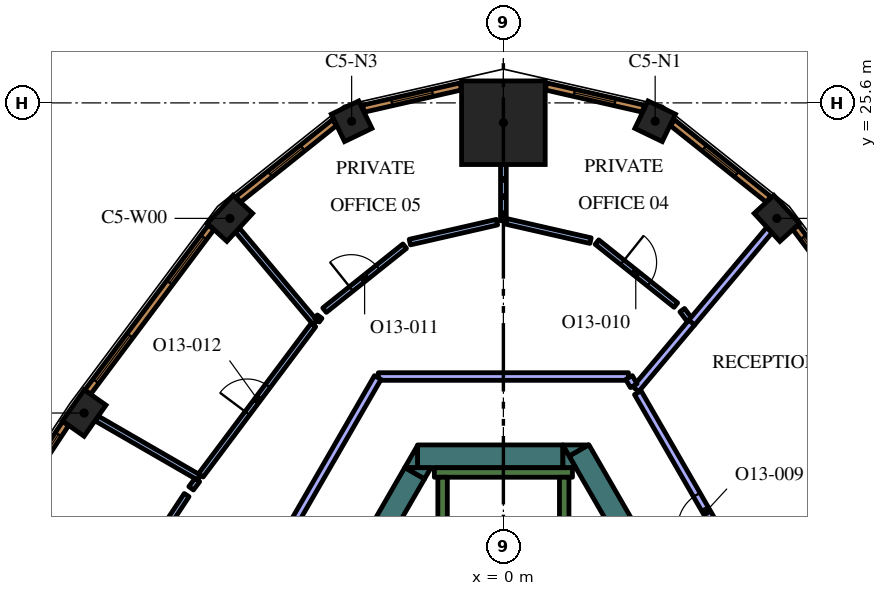
"""IFC4 building model, lengths in metres.
Left out: names, types, materials, properties, quantities, classifications, styles, units other than length and angle.
Written with IfcOpenShell. Run it as: python <this file> out.ifc"""

import sys

from ifc_helpers import new_model, si_unit, direction, frame, frame_2d, origin, origin_2d, place, context, subcontext, project, spatial, polyline, rectangle, outline, extrude, element, fill, save


model = new_model("IFC4")
c1 = context("Model", 3, precision=1e-05, world=origin(), true_north=direction((0.0, 1.0)))
c2 = subcontext(c1, "Body", "Model", "MODEL_VIEW")
j1 = project(units=[si_unit("LENGTHUNIT", "METRE"), si_unit("PLANEANGLEUNIT", "RADIAN")], contexts=[c1])
p1 = place(None, origin())
s1 = spatial("IfcSite", under=j1, at=p1, CompositionType="ELEMENT")
p2 = place(p1, origin())
s2 = spatial("IfcBuilding", under=s1, at=p2, CompositionType="ELEMENT")
p3 = place(p2, frame((0.0, 0.0, 296.4)))
s3 = spatial("IfcBuildingStorey", under=s2, at=p3, CompositionType="ELEMENT", Elevation=296.4)
p4 = place(p3, frame((0.0, 25.078, 0.0), z_axis=(0.0, 0.0, 1.0), x_axis=(0.0, 1.0, 0.0)))
e1 = element("IfcColumn", 1, at=p4, inside=s3, PredefinedType="COLUMN", context=c2, shape_type="SweptSolid", body=[
    extrude(rectangle(XDim=2.2, YDim=2.2, at=origin_2d()), origin(), (0.0, 0.0, 1.0), 4.2),
])
p5 = place(p3, frame((7.195, 22.561, 0.0), z_axis=(0.0, 0.0, 1.0), x_axis=(-0.67580250023, 0.737082750228, 0.0)))
e2 = element("IfcColumn", 2, at=p5, inside=s3, PredefinedType="COLUMN", context=c2, shape_type="SweptSolid", body=[
    extrude(rectangle(XDim=1.0, YDim=0.7, at=origin_2d()), origin(), (0.0, 0.0, 1.0), 4.2),
])
for number, where, z_axis, x_axis in (
    (3, (3.993, 25.116, 0.0), (0.0, 0.0, 1.0), (-0.901, 0.434, 0.0)),
    (4, (-3.993, 25.116, 0.0), (0.0, 0.0, 1.0), (-0.901, -0.434, 0.0)),
):
    element("IfcColumn", number, at=place(p3, frame(where, z_axis=z_axis, x_axis=x_axis)), inside=s3, PredefinedType="COLUMN", context=c2, shape_type="SweptSolid", body=[
        extrude(rectangle(XDim=0.8, YDim=0.8, at=origin_2d()), origin(), (0.0, 0.0, 1.0), 4.2),
    ])
for number, where, z_axis, x_axis in (
    (5, (-7.195, 22.561, 0.0), (0.0, 0.0, 1.0), (-0.676, -0.737, 0.0)),
    (6, (-11.032, 17.44, 0.0), (0.0, 0.0, 1.0), (-0.575, -0.818, 0.0)),
):
    element("IfcColumn", number, at=place(p3, frame(where, z_axis=z_axis, x_axis=x_axis)), inside=s3, PredefinedType="COLUMN", context=c2, shape_type="SweptSolid", body=[
        extrude(rectangle(XDim=1.0, YDim=0.7, at=origin_2d()), origin(), (0.0, 0.0, 1.0), 4.2),
    ])
p6 = place(p3, frame((1.989, 16.456, 0.0), z_axis=(0.0, 0.0, 1.0), x_axis=(0.499973159588, -0.866040899549, 0.0)))
e7 = element("IfcWall", 7, at=p6, inside=s3, PredefinedType="SOLIDWALL", context=c2, shape_type="SweptSolid", body=[
    extrude(rectangle(XDim=6.828, YDim=0.6, at=frame_2d((3.414, 0.0))), origin(), (0.0, 0.0, 1.0), 4.2),
])
p7 = place(p3, origin())
e8 = element("IfcWall", 8, at=p7, inside=s3, PredefinedType="SOLIDWALL", context=c2, shape_type="SweptSolid", body=[
    extrude(outline(polyline([(1.559, 16.6), (2.235, 16.6), (1.728, 16.307), (1.559, 16.6)])), origin(), (0.0, 0.0, 1.0), 4.2),
])
p8 = place(p3, frame((-2.258, 16.3, 0.0), z_axis=(0.0, 0.0, 1.0), x_axis=(1.0, 0.0, 0.0)))
e9 = element("IfcWall", 9, at=p8, inside=s3, PredefinedType="SOLIDWALL", context=c2, shape_type="SweptSolid", body=[
    extrude(rectangle(XDim=3.823, YDim=0.6, at=frame_2d((1.912, 0.0))), origin(), (0.0, 0.0, 1.0), 4.2),
])
e10 = element("IfcWall", 10, at=p7, inside=s3, PredefinedType="SOLIDWALL", context=c2, shape_type="SweptSolid", body=[
    extrude(outline(polyline([(1.905, 16.0), (1.567, 16.0), (1.567, 16.585), (1.905, 16.0)])), origin(), (0.0, 0.0, 1.0), 4.2),
])
e11 = element("IfcWall", 11, at=p7, inside=s3, PredefinedType="SOLIDWALL", context=c2, shape_type="SweptSolid", body=[
    extrude(outline(polyline([(-2.598, 16.0), (-2.26, 16.585), (-2.26, 16.0), (-2.598, 16.0)])), origin(), (0.0, 0.0, 1.0), 4.2),
])
p9 = place(p3, frame((-2.335, 15.855, 0.0), z_axis=(0.0, 0.0, 1.0), x_axis=(-0.499960127962, -0.866048422692, 0.0)))
e12 = element("IfcWall", 12, at=p9, inside=s3, PredefinedType="SOLIDWALL", context=c2, shape_type="SweptSolid", body=[
    extrude(rectangle(XDim=2.934, YDim=0.6, at=frame_2d((1.467, 0.0))), origin(), (0.0, 0.0, 1.0), 4.2),
])
e13 = element("IfcWall", 13, at=p7, inside=s3, PredefinedType="SOLIDWALL", context=c2, shape_type="SweptSolid", body=[
    extrude(outline(polyline([(-1.905, 16.0), (-2.074, 15.707), (-2.581, 16.0), (-1.905, 16.0)])), origin(), (0.0, 0.0, 1.0), 4.2),
])
p10 = place(p3, frame((-1.817, 15.875, 0.0), z_axis=(0.0, 0.0, 1.0), x_axis=(1.0, 0.0, 0.0)))
e14 = element("IfcWall", 14, at=p10, inside=s3, PredefinedType="SOLIDWALL", context=c2, shape_type="SweptSolid", body=[
    extrude(rectangle(XDim=3.634, YDim=0.25, at=frame_2d((1.817, 0.0))), origin(), (0.0, 0.0, 1.0), 4.2),
])
p11 = place(p3, frame((1.6, 8.95, 0.0), z_axis=(0.0, 0.0, 1.0), x_axis=(0.0, 1.0, 0.0)))
e15 = element("IfcWall", 15, at=p11, inside=s3, PredefinedType="SOLIDWALL", context=c2, shape_type="SweptSolid", body=[
    extrude(rectangle(XDim=6.8, YDim=0.25, at=frame_2d((3.4, 0.0))), origin(), (0.0, 0.0, 1.0), 4.2),
])
p12 = place(p3, frame((-1.6, 8.7, 0.0), z_axis=(0.0, 0.0, 1.0), x_axis=(0.0, 1.0, 0.0)))
e16 = element("IfcWall", 16, at=p12, inside=s3, PredefinedType="SOLIDWALL", context=c2, shape_type="SweptSolid", body=[
    extrude(rectangle(XDim=7.05, YDim=0.25, at=frame_2d((3.525, 0.0))), origin(), (0.0, 0.0, 1.0), 4.2),
])
p13 = place(p3, frame((4.95, 19.814, 0.0), z_axis=(0.0, 0.0, 1.0), x_axis=(0.642981953866, 0.765881326971, 0.0)))
e17 = element("IfcWall", 17, at=p13, inside=s3, PredefinedType="PARTITIONING", context=c2, shape_type="SweptSolid", body=[
    extrude(rectangle(XDim=3.188, YDim=0.2, at=frame_2d((1.594, 0.0))), origin(), (0.0, 0.0, 1.0), 3.55),
])
p14 = place(p3, frame((3.483, 18.067, 0.0), z_axis=(0.0, 0.0, 1.0), x_axis=(0.642896944312, 0.765952687177, 0.0)))
e18 = element("IfcWall", 18, at=p14, inside=s3, PredefinedType="PARTITIONING", context=c2, shape_type="SweptSolid", body=[
    extrude(rectangle(XDim=2.29, YDim=0.2, at=frame_2d((1.145, 0.0))), origin(), (0.0, 0.0, 1.0), 3.55),
])
p15 = place(p3, frame((7.188, 11.65, 0.0), z_axis=(0.0, 0.0, 1.0), x_axis=(-0.499989634868, 0.866031388014, 0.0)))
e19 = element("IfcWall", 19, at=p15, inside=s3, PredefinedType="PARTITIONING", context=c2, shape_type="SweptSolid", body=[
    extrude(rectangle(XDim=7.303, YDim=0.2, at=frame_2d((3.652, 0.0))), origin(), (0.0, 0.0, 1.0), 3.55),
])
p16 = place(p15, frame((3.2, 0.0, 0.0)))
e20 = element("IfcOpeningElement", 20, at=p16, cuts=e19, PredefinedType="OPENING", context=c2, shape_type="SweptSolid", body=[
    extrude(rectangle(XDim=1.0, YDim=2.1, at=frame_2d((0.5, 1.05))), frame((0.0, 0.11, 0.0), z_axis=(0.0, -1.0, 0.0), x_axis=(1.0, 0.0, 0.0)), (0.0, 0.0, 1.0), 0.22),
])
p17 = place(p3, frame((0.0, 22.5, 0.0), z_axis=(0.0, 0.0, 1.0), x_axis=(0.0, 1.0, 0.0)))
e21 = element("IfcWall", 21, at=p17, inside=s3, PredefinedType="PARTITIONING", context=c2, shape_type="SweptSolid", body=[
    extrude(rectangle(XDim=1.479, YDim=0.15, at=frame_2d((0.739, 0.0))), origin(), (0.0, 0.0, 1.0), 3.55),
])
p18 = place(p3, frame((4.891, 19.899, 0.0), z_axis=(0.0, 0.0, 1.0), x_axis=(-0.6, 0.8, 0.0)))
e22 = element("IfcWall", 22, at=p18, inside=s3, PredefinedType="PARTITIONING", context=c2, shape_type="SweptSolid", body=[
    extrude(rectangle(XDim=0.309, YDim=0.15, at=frame_2d((0.154, 0.0))), origin(), (0.0, 0.0, 1.0), 3.55),
])
p19 = place(p3, frame((2.462, 21.937, 0.0), z_axis=(0.0, 0.0, 1.0), x_axis=(0.781630346222, -0.62374193531, 0.0)))
e23 = element("IfcWall", 23, at=p19, inside=s3, PredefinedType="PARTITIONING", context=c2, shape_type="SweptSolid", body=[
    extrude(rectangle(XDim=2.656, YDim=0.15, at=frame_2d((1.328, 0.0))), origin(), (0.0, 0.0, 1.0), 3.55),
])
p20 = place(p19, frame((0.857, 0.0, 0.0)))
e24 = element("IfcOpeningElement", 24, at=p20, cuts=e23, PredefinedType="OPENING", context=c2, shape_type="SweptSolid", body=[
    extrude(rectangle(XDim=0.9, YDim=2.1, at=frame_2d((0.45, 1.05))), frame((0.0, 0.085, 0.0), z_axis=(0.0, -1.0, 0.0), x_axis=(1.0, 0.0, 0.0)), (0.0, 0.0, 1.0), 0.17),
])
p21 = place(p3, frame((2.293, 21.976, 0.0), z_axis=(0.0, 0.0, 1.0), x_axis=(-0.974905760283, 0.22261796551, 0.0)))
e25 = element("IfcWall", 25, at=p21, inside=s3, PredefinedType="PARTITIONING", context=c2, shape_type="SweptSolid", body=[
    extrude(rectangle(XDim=2.276, YDim=0.15, at=frame_2d((1.138, 0.0))), origin(), (0.0, 0.0, 1.0), 3.55),
])
p22 = place(p3, frame((-4.952, 19.817, 0.0), z_axis=(0.0, 0.0, 1.0), x_axis=(-0.643023053688, 0.765846820471, 0.0)))
e26 = element("IfcWall", 26, at=p22, inside=s3, PredefinedType="PARTITIONING", context=c2, shape_type="SweptSolid", body=[
    extrude(rectangle(XDim=3.184, YDim=0.15, at=frame_2d((1.592, 0.0))), origin(), (0.0, 0.0, 1.0), 3.55),
])
p23 = place(p3, frame((-0.168, 22.461, 0.0), z_axis=(0.0, 0.0, 1.0), x_axis=(-0.974885550769, -0.222706450069, 0.0)))
e27 = element("IfcWall", 27, at=p23, inside=s3, PredefinedType="PARTITIONING", context=c2, shape_type="SweptSolid", body=[
    extrude(rectangle(XDim=2.353, YDim=0.15, at=frame_2d((1.176, 0.0))), origin(), (0.0, 0.0, 1.0), 3.55),
])
p24 = place(p3, frame((-4.706, 20.146, 0.0), z_axis=(0.0, 0.0, 1.0), x_axis=(0.781592149204, 0.623789798172, 0.0)))
e28 = element("IfcWall", 28, at=p24, inside=s3, PredefinedType="PARTITIONING", context=c2, shape_type="SweptSolid", body=[
    extrude(rectangle(XDim=2.698, YDim=0.15, at=frame_2d((1.349, 0.0))), origin(), (0.0, 0.0, 1.0), 3.55),
])
p25 = place(p24, frame((0.898, 0.0, 0.0)))
e29 = element("IfcOpeningElement", 29, at=p25, cuts=e28, PredefinedType="OPENING", context=c2, shape_type="SweptSolid", body=[
    extrude(rectangle(XDim=0.9, YDim=2.1, at=frame_2d((0.45, 1.05))), frame((0.0, 0.085, 0.0), z_axis=(0.0, -1.0, 0.0), x_axis=(1.0, 0.0, 0.0)), (0.0, 0.0, 1.0), 0.17),
])
p26 = place(p3, frame((-4.834, 19.975, 0.0), z_axis=(0.0, 0.0, 1.0), x_axis=(-0.599349659863, -0.800487342325, 0.0)))
e30 = element("IfcWall", 30, at=p26, inside=s3, PredefinedType="PARTITIONING", context=c2, shape_type="SweptSolid", body=[
    extrude(rectangle(XDim=0.12, YDim=0.15, at=frame_2d((0.06, 0.0))), origin(), (0.0, 0.0, 1.0), 3.55),
])
p27 = place(p3, frame((-8.007, 15.74, 0.0), z_axis=(0.0, 0.0, 1.0), x_axis=(-0.866044607523, 0.499966736674, 0.0)))
e31 = element("IfcWall", 31, at=p27, inside=s3, PredefinedType="PARTITIONING", context=c2, shape_type="SweptSolid", body=[
    extrude(rectangle(XDim=3.115, YDim=0.15, at=frame_2d((1.557, 0.0))), origin(), (0.0, 0.0, 1.0), 3.55),
])
p28 = place(p3, frame((-7.962, 15.8, 0.0), z_axis=(0.0, 0.0, 1.0), x_axis=(0.599541489613, 0.800343677574, 0.0)))
e32 = element("IfcWall", 32, at=p28, inside=s3, PredefinedType="PARTITIONING", context=c2, shape_type="SweptSolid", body=[
    extrude(rectangle(XDim=4.942, YDim=0.15, at=frame_2d((2.471, 0.0))), origin(), (0.0, 0.0, 1.0), 3.55),
])
p29 = place(p28, frame((2.042, 0.0, 0.0)))
e33 = element("IfcOpeningElement", 33, at=p29, cuts=e32, PredefinedType="OPENING", context=c2, shape_type="SweptSolid", body=[
    extrude(rectangle(XDim=0.9, YDim=2.1, at=frame_2d((0.45, 1.05))), frame((0.0, 0.085, 0.0), z_axis=(0.0, -1.0, 0.0), x_axis=(1.0, 0.0, 0.0)), (0.0, 0.0, 1.0), 0.17),
])
p30 = place(p3, frame((-8.052, 15.679, 0.0), z_axis=(0.0, 0.0, 1.0), x_axis=(-0.599004157744, -0.800745914136, 0.0)))
e34 = element("IfcWall", 34, at=p30, inside=s3, PredefinedType="PARTITIONING", context=c2, shape_type="SweptSolid", body=[
    extrude(rectangle(XDim=0.275, YDim=0.15, at=frame_2d((0.137, 0.0))), origin(), (0.0, 0.0, 1.0), 3.55),
])
p31 = place(p3, frame((-11.523, 10.449, 0.0), z_axis=(0.0, 0.0, 1.0), x_axis=(0.550751709023, 0.834669129061, 0.0)))
e35 = element("IfcWall", 35, at=p31, inside=s3, PredefinedType="PARTITIONING", context=c2, shape_type="SweptSolid", body=[
    extrude(rectangle(XDim=5.788, YDim=0.15, at=frame_2d((2.894, 0.0))), origin(), (0.0, 0.0, 1.0), 3.55),
])
p32 = place(p31, frame((2.488, 0.0, 0.0)))
e36 = element("IfcOpeningElement", 36, at=p32, cuts=e35, PredefinedType="OPENING", context=c2, shape_type="SweptSolid", body=[
    extrude(rectangle(XDim=0.9, YDim=2.1, at=frame_2d((0.45, 1.05))), frame((0.0, 0.085, 0.0), z_axis=(0.0, -1.0, 0.0), x_axis=(1.0, 0.0, 0.0)), (0.0, 0.0, 1.0), 0.17),
])
p33 = place(p3, frame((3.291, 18.4, 0.0), z_axis=(0.0, 0.0, 1.0), x_axis=(-1.0, 0.0, 0.0)))
e37 = element("IfcWall", 37, at=p33, inside=s3, PredefinedType="PARTITIONING", context=c2, shape_type="SweptSolid", body=[
    extrude(rectangle(XDim=6.582, YDim=0.2, at=frame_2d((3.291, 0.0))), origin(), (0.0, 0.0, 1.0), 3.55),
])
p34 = place(p3, frame((-3.306, 18.374, 0.0), z_axis=(0.0, 0.0, 1.0), x_axis=(-0.499999798456, -0.866025520146, 0.0)))
e38 = element("IfcWall", 38, at=p34, inside=s3, PredefinedType="PARTITIONING", context=c2, shape_type="SweptSolid", body=[
    extrude(rectangle(XDim=8.229, YDim=0.2, at=frame_2d((4.115, 0.0))), origin(), (0.0, 0.0, 1.0), 3.55),
])
p35 = place(p3, frame((3.43, 18.159, 0.0), z_axis=(0.0, 0.0, 1.0), x_axis=(-0.499949632511, 0.866054481515, 0.0)))
e39 = element("IfcWall", 39, at=p35, inside=s3, PredefinedType="PARTITIONING", context=c2, shape_type="SweptSolid", body=[
    extrude(rectangle(XDim=0.248, YDim=0.2, at=frame_2d((0.124, 0.0))), origin(), (0.0, 0.0, 1.0), 3.55),
])
p36 = place(p3, frame((10.938, 17.99, 0.0), z_axis=(0.0, 0.0, 1.0), x_axis=(-0.599559865294, 0.800329911929, 0.0)))
e40 = element("IfcWall", 40, at=p36, inside=s3, PredefinedType="SOLIDWALL", context=c2, shape_type="SweptSolid", body=[
    extrude(rectangle(XDim=5.415, YDim=0.19, at=frame_2d((2.708, 0.0))), origin(), (0.0, 0.0, 1.0), 3.95),
])
p37 = place(p36, frame((0.358, 0.0, 0.6)))
e41 = element("IfcOpeningElement", 41, at=p37, cuts=e40, PredefinedType="OPENING", context=c2, shape_type="SweptSolid", body=[
    extrude(rectangle(XDim=1.5, YDim=2.85, at=frame_2d((0.75, 1.425))), frame((0.0, 0.105, 0.0), z_axis=(0.0, -1.0, 0.0), x_axis=(1.0, 0.0, 0.0)), (0.0, 0.0, 1.0), 0.21),
])
p38 = place(p36, frame((3.593, 0.0, 0.6)))
e42 = element("IfcOpeningElement", 42, at=p38, cuts=e40, PredefinedType="OPENING", context=c2, shape_type="SweptSolid", body=[
    extrude(rectangle(XDim=1.5, YDim=2.85, at=frame_2d((0.75, 1.425))), frame((0.0, 0.105, 0.0), z_axis=(0.0, -1.0, 0.0), x_axis=(1.0, 0.0, 0.0)), (0.0, 0.0, 1.0), 0.21),
])
p39 = place(p3, frame((6.977, 23.061, 0.0), z_axis=(0.0, 0.0, 1.0), x_axis=(-0.781626234064, 0.623747088349, 0.0)))
e43 = element("IfcWall", 43, at=p39, inside=s3, PredefinedType="SOLIDWALL", context=c2, shape_type="SweptSolid", body=[
    extrude(rectangle(XDim=3.237, YDim=0.19, at=frame_2d((1.618, 0.0))), origin(), (0.0, 0.0, 1.0), 3.95),
])
p40 = place(p39, frame((1.068, 0.0, 0.6)))
e44 = element("IfcOpeningElement", 44, at=p40, cuts=e43, PredefinedType="OPENING", context=c2, shape_type="SweptSolid", body=[
    extrude(rectangle(XDim=1.1, YDim=2.85, at=frame_2d((0.55, 1.425))), frame((0.0, 0.105, 0.0), z_axis=(0.0, -1.0, 0.0), x_axis=(1.0, 0.0, 0.0)), (0.0, 0.0, 1.0), 0.21),
])
p41 = place(p3, frame((3.683, 25.449, 0.0), z_axis=(0.0, 0.0, 1.0), x_axis=(-0.974913273386, 0.222585060988, 0.0)))
e45 = element("IfcWall", 45, at=p41, inside=s3, PredefinedType="SOLIDWALL", context=c2, shape_type="SweptSolid", body=[
    extrude(rectangle(XDim=2.627, YDim=0.19, at=frame_2d((1.313, 0.0))), origin(), (0.0, 0.0, 1.0), 3.95),
])
p42 = place(p41, frame((0.763, 0.0, 0.6)))
e46 = element("IfcOpeningElement", 46, at=p42, cuts=e45, PredefinedType="OPENING", context=c2, shape_type="SweptSolid", body=[
    extrude(rectangle(XDim=1.1, YDim=2.85, at=frame_2d((0.55, 1.425))), frame((0.0, 0.105, 0.0), z_axis=(0.0, -1.0, 0.0), x_axis=(1.0, 0.0, 0.0)), (0.0, 0.0, 1.0), 0.21),
])
p43 = place(p3, frame((-1.122, 26.033, 0.0), z_axis=(0.0, 0.0, 1.0), x_axis=(-0.974913273386, -0.222585060988, 0.0)))
e47 = element("IfcWall", 47, at=p43, inside=s3, PredefinedType="SOLIDWALL", context=c2, shape_type="SweptSolid", body=[
    extrude(rectangle(XDim=2.627, YDim=0.19, at=frame_2d((1.313, 0.0))), origin(), (0.0, 0.0, 1.0), 3.95),
])
p44 = place(p43, frame((0.763, 0.0, 0.6)))
e48 = element("IfcOpeningElement", 48, at=p44, cuts=e47, PredefinedType="OPENING", context=c2, shape_type="SweptSolid", body=[
    extrude(rectangle(XDim=1.1, YDim=2.85, at=frame_2d((0.55, 1.425))), frame((0.0, 0.105, 0.0), z_axis=(0.0, -1.0, 0.0), x_axis=(1.0, 0.0, 0.0)), (0.0, 0.0, 1.0), 0.21),
])
p45 = place(p3, frame((-4.448, 25.08, 0.0), z_axis=(0.0, 0.0, 1.0), x_axis=(-0.781626234064, -0.623747088349, 0.0)))
e49 = element("IfcWall", 49, at=p45, inside=s3, PredefinedType="SOLIDWALL", context=c2, shape_type="SweptSolid", body=[
    extrude(rectangle(XDim=3.237, YDim=0.19, at=frame_2d((1.618, 0.0))), origin(), (0.0, 0.0, 1.0), 3.95),
])
p46 = place(p45, frame((1.068, 0.0, 0.6)))
e50 = element("IfcOpeningElement", 50, at=p46, cuts=e49, PredefinedType="OPENING", context=c2, shape_type="SweptSolid", body=[
    extrude(rectangle(XDim=1.1, YDim=2.85, at=frame_2d((0.55, 1.425))), frame((0.0, 0.105, 0.0), z_axis=(0.0, -1.0, 0.0), x_axis=(1.0, 0.0, 0.0)), (0.0, 0.0, 1.0), 0.21),
])
p47 = place(p3, frame((-7.692, 22.324, 0.0), z_axis=(0.0, 0.0, 1.0), x_axis=(-0.599559865294, -0.800329911929, 0.0)))
e51 = element("IfcWall", 51, at=p47, inside=s3, PredefinedType="SOLIDWALL", context=c2, shape_type="SweptSolid", body=[
    extrude(rectangle(XDim=5.415, YDim=0.19, at=frame_2d((2.708, 0.0))), origin(), (0.0, 0.0, 1.0), 3.95),
])
p48 = place(p47, frame((0.323, 0.0, 0.6)))
e52 = element("IfcOpeningElement", 52, at=p48, cuts=e51, PredefinedType="OPENING", context=c2, shape_type="SweptSolid", body=[
    extrude(rectangle(XDim=1.5, YDim=2.85, at=frame_2d((0.75, 1.425))), frame((0.0, 0.105, 0.0), z_axis=(0.0, -1.0, 0.0), x_axis=(1.0, 0.0, 0.0)), (0.0, 0.0, 1.0), 0.21),
])
p49 = place(p47, frame((3.558, 0.0, 0.6)))
e53 = element("IfcOpeningElement", 53, at=p49, cuts=e51, PredefinedType="OPENING", context=c2, shape_type="SweptSolid", body=[
    extrude(rectangle(XDim=1.5, YDim=2.85, at=frame_2d((0.75, 1.425))), frame((0.0, 0.105, 0.0), z_axis=(0.0, -1.0, 0.0), x_axis=(1.0, 0.0, 0.0)), (0.0, 0.0, 1.0), 0.21),
])
p50 = place(p3, frame((-11.518, 17.166, 0.0), z_axis=(0.0, 0.0, 1.0), x_axis=(-0.550744054781, -0.83467417962, 0.0)))
e54 = element("IfcWall", 54, at=p50, inside=s3, PredefinedType="SOLIDWALL", context=c2, shape_type="SweptSolid", body=[
    extrude(rectangle(XDim=5.406, YDim=0.19, at=frame_2d((2.703, 0.0))), origin(), (0.0, 0.0, 1.0), 3.95),
])
p51 = place(p50, frame((0.346, 0.0, 0.6)))
e55 = element("IfcOpeningElement", 55, at=p51, cuts=e54, PredefinedType="OPENING", context=c2, shape_type="SweptSolid", body=[
    extrude(rectangle(XDim=1.5, YDim=2.85, at=frame_2d((0.75, 1.425))), frame((0.0, 0.105, 0.0), z_axis=(0.0, -1.0, 0.0), x_axis=(1.0, 0.0, 0.0)), (0.0, 0.0, 1.0), 0.21),
])
p52 = place(p50, frame((3.559, 0.0, 0.6)))
e56 = element("IfcOpeningElement", 56, at=p52, cuts=e54, PredefinedType="OPENING", context=c2, shape_type="SweptSolid", body=[
    extrude(rectangle(XDim=1.5, YDim=2.85, at=frame_2d((0.75, 1.425))), frame((0.0, 0.105, 0.0), z_axis=(0.0, -1.0, 0.0), x_axis=(1.0, 0.0, 0.0)), (0.0, 0.0, 1.0), 0.21),
])
p53 = place(p16, origin())
e57 = element("IfcDoor", 57, at=p53, inside=s3, OperationType="SINGLE_SWING_RIGHT", PredefinedType="DOOR", context=c2, shape_type="SweptSolid", body=[
    extrude(rectangle(XDim=1.0, YDim=2.1, at=frame_2d((0.5, 1.05))), frame((0.0, 0.025, 0.0), z_axis=(0.0, -1.0, 0.0), x_axis=(1.0, 0.0, 0.0)), (0.0, 0.0, 1.0), 0.05),
])
fill(e20, e57)
p54 = place(p20, origin())
e58 = element("IfcDoor", 58, at=p54, inside=s3, OperationType="SINGLE_SWING_LEFT", PredefinedType="DOOR", context=c2, shape_type="SweptSolid", body=[
    extrude(rectangle(XDim=0.9, YDim=2.1, at=frame_2d((0.45, 1.05))), frame((0.0, 0.025, 0.0), z_axis=(0.0, -1.0, 0.0), x_axis=(1.0, 0.0, 0.0)), (0.0, 0.0, 1.0), 0.05),
])
fill(e24, e58)
p55 = place(p25, origin())
e59 = element("IfcDoor", 59, at=p55, inside=s3, OperationType="SINGLE_SWING_LEFT", PredefinedType="DOOR", context=c2, shape_type="SweptSolid", body=[
    extrude(rectangle(XDim=0.9, YDim=2.1, at=frame_2d((0.45, 1.05))), frame((0.0, 0.025, 0.0), z_axis=(0.0, -1.0, 0.0), x_axis=(1.0, 0.0, 0.0)), (0.0, 0.0, 1.0), 0.05),
])
fill(e29, e59)
p56 = place(p29, origin())
e60 = element("IfcDoor", 60, at=p56, inside=s3, OperationType="SINGLE_SWING_RIGHT", PredefinedType="DOOR", context=c2, shape_type="SweptSolid", body=[
    extrude(rectangle(XDim=0.9, YDim=2.1, at=frame_2d((0.45, 1.05))), frame((0.0, 0.025, 0.0), z_axis=(0.0, -1.0, 0.0), x_axis=(1.0, 0.0, 0.0)), (0.0, 0.0, 1.0), 0.05),
])
fill(e33, e60)
p57 = place(p38, origin())
e61 = element("IfcWindow", 61, at=p57, inside=s3, PartitioningType="SINGLE_PANEL", PredefinedType="WINDOW", context=c2, shape_type="SweptSolid", body=[
    extrude(rectangle(XDim=1.5, YDim=2.85, at=frame_2d((0.75, 1.425))), frame((0.0, 0.045, 0.0), z_axis=(0.0, -1.0, 0.0), x_axis=(1.0, 0.0, 0.0)), (0.0, 0.0, 1.0), 0.06),
])
fill(e42, e61)
p58 = place(p40, origin())
e62 = element("IfcWindow", 62, at=p58, inside=s3, PartitioningType="SINGLE_PANEL", PredefinedType="WINDOW", context=c2, shape_type="SweptSolid", body=[
    extrude(rectangle(XDim=1.1, YDim=2.85, at=frame_2d((0.55, 1.425))), frame((0.0, 0.045, 0.0), z_axis=(0.0, -1.0, 0.0), x_axis=(1.0, 0.0, 0.0)), (0.0, 0.0, 1.0), 0.06),
])
fill(e44, e62)
p59 = place(p42, origin())
e63 = element("IfcWindow", 63, at=p59, inside=s3, PartitioningType="SINGLE_PANEL", PredefinedType="WINDOW", context=c2, shape_type="SweptSolid", body=[
    extrude(rectangle(XDim=1.1, YDim=2.85, at=frame_2d((0.55, 1.425))), frame((0.0, 0.045, 0.0), z_axis=(0.0, -1.0, 0.0), x_axis=(1.0, 0.0, 0.0)), (0.0, 0.0, 1.0), 0.06),
])
fill(e46, e63)
p60 = place(p44, origin())
e64 = element("IfcWindow", 64, at=p60, inside=s3, PartitioningType="SINGLE_PANEL", PredefinedType="WINDOW", context=c2, shape_type="SweptSolid", body=[
    extrude(rectangle(XDim=1.1, YDim=2.85, at=frame_2d((0.55, 1.425))), frame((0.0, 0.045, 0.0), z_axis=(0.0, -1.0, 0.0), x_axis=(1.0, 0.0, 0.0)), (0.0, 0.0, 1.0), 0.06),
])
fill(e48, e64)
p61 = place(p46, origin())
e65 = element("IfcWindow", 65, at=p61, inside=s3, PartitioningType="SINGLE_PANEL", PredefinedType="WINDOW", context=c2, shape_type="SweptSolid", body=[
    extrude(rectangle(XDim=1.1, YDim=2.85, at=frame_2d((0.55, 1.425))), frame((0.0, 0.045, 0.0), z_axis=(0.0, -1.0, 0.0), x_axis=(1.0, 0.0, 0.0)), (0.0, 0.0, 1.0), 0.06),
])
fill(e50, e65)
p62 = place(p48, origin())
e66 = element("IfcWindow", 66, at=p62, inside=s3, PartitioningType="SINGLE_PANEL", PredefinedType="WINDOW", context=c2, shape_type="SweptSolid", body=[
    extrude(rectangle(XDim=1.5, YDim=2.85, at=frame_2d((0.75, 1.425))), frame((0.0, 0.045, 0.0), z_axis=(0.0, -1.0, 0.0), x_axis=(1.0, 0.0, 0.0)), (0.0, 0.0, 1.0), 0.06),
])
fill(e52, e66)
p63 = place(p49, origin())
e67 = element("IfcWindow", 67, at=p63, inside=s3, PartitioningType="SINGLE_PANEL", PredefinedType="WINDOW", context=c2, shape_type="SweptSolid", body=[
    extrude(rectangle(XDim=1.5, YDim=2.85, at=frame_2d((0.75, 1.425))), frame((0.0, 0.045, 0.0), z_axis=(0.0, -1.0, 0.0), x_axis=(1.0, 0.0, 0.0)), (0.0, 0.0, 1.0), 0.06),
])
fill(e53, e67)
p64 = place(p51, origin())
e68 = element("IfcWindow", 68, at=p64, inside=s3, PartitioningType="SINGLE_PANEL", PredefinedType="WINDOW", context=c2, shape_type="SweptSolid", body=[
    extrude(rectangle(XDim=1.5, YDim=2.85, at=frame_2d((0.75, 1.425))), frame((0.0, 0.045, 0.0), z_axis=(0.0, -1.0, 0.0), x_axis=(1.0, 0.0, 0.0)), (0.0, 0.0, 1.0), 0.06),
])
fill(e55, e68)
save(model, sys.argv[1])
